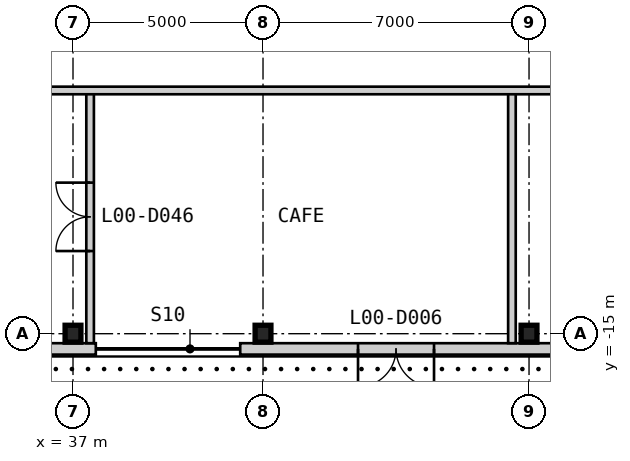
"""IFC4 building model, lengths in metres.
Left out: names, types, materials, properties, quantities, classifications, styles, units other than length and angle.
Written with IfcOpenShell. Run it as: python <this file> out.ifc"""

import sys

from ifc_helpers import new_model, si_unit, direction, frame, frame_2d, origin, origin_2d, place, context, subcontext, project, spatial, rectangle, i_section, extrude, element, fill, save


model = new_model("IFC4")
c1 = context("Model", 3, precision=1e-05, world=origin(), true_north=direction((0.0, 1.0)))
c2 = subcontext(c1, "Body", "Model", "MODEL_VIEW")
j1 = project(units=[si_unit("LENGTHUNIT", "METRE"), si_unit("PLANEANGLEUNIT", "RADIAN")], contexts=[c1])
p1 = place(None, origin())
s1 = spatial("IfcSite", under=j1, at=p1, CompositionType="ELEMENT")
p2 = place(p1, origin())
s2 = spatial("IfcBuilding", under=s1, at=p2, CompositionType="ELEMENT")
p3 = place(p2, origin())
s3 = spatial("IfcBuildingStorey", under=s2, at=p3, CompositionType="ELEMENT", Elevation=0.0)
for number, where, z_axis, x_axis in (
    (1, (37.0, -15.0, -0.3), (0.0, 0.0, 1.0), (1.0, 0.0, 0.0)),
    (2, (42.0, -15.0, -0.3), (0.0, 0.0, 1.0), (1.0, 0.0, 0.0)),
    (3, (49.0, -15.0, -0.3), (0.0, 0.0, 1.0), (1.0, 0.0, 0.0)),
):
    element("IfcColumn", number, at=place(p3, frame(where, z_axis=z_axis, x_axis=x_axis)), inside=s3, PredefinedType="COLUMN", context=c2, shape_type="SweptSolid", body=[
        extrude(i_section(OverallWidth=0.417, OverallDepth=0.445, WebThickness=0.039, FlangeThickness=0.063, at=origin_2d()), origin(), (0.0, 0.0, 1.0), 7.3),
    ])
p4 = place(p3, frame((36.4, -15.4, 0.0), z_axis=(0.0, 0.0, 1.0), x_axis=(1.0, 0.0, 0.0)))
e4 = element("IfcWall", 4, at=p4, inside=s3, PredefinedType="SOLIDWALL", context=c2, shape_type="SweptSolid", body=[
    extrude(rectangle(XDim=1.2, YDim=0.3, at=frame_2d((0.6, 0.0))), origin(), (0.0, 0.0, 1.0), 6.7),
])
p5 = place(p3, frame((41.4, -15.4, 0.0), z_axis=(0.0, 0.0, 1.0), x_axis=(1.0, 0.0, 0.0)))
e5 = element("IfcWall", 5, at=p5, inside=s3, PredefinedType="SOLIDWALL", context=c2, shape_type="SweptSolid", body=[
    extrude(rectangle(XDim=8.2, YDim=0.3, at=frame_2d((4.1, 0.0))), origin(), (0.0, 0.0, 1.0), 6.7),
])
p6 = place(p5, frame((3.1, 0.0, 0.0)))
e6 = element("IfcOpeningElement", 6, at=p6, cuts=e5, PredefinedType="OPENING", context=c2, shape_type="SweptSolid", body=[
    extrude(rectangle(XDim=2.0, YDim=3.0, at=frame_2d((1.0, 1.5))), frame((0.0, 0.16, 0.0), z_axis=(0.0, -1.0, 0.0), x_axis=(1.0, 0.0, 0.0)), (0.0, 0.0, 1.0), 0.32),
])
p7 = place(p3, frame((37.45, -15.25, 0.0), z_axis=(0.0, 0.0, 1.0), x_axis=(0.0, 1.0, 0.0)))
e7 = element("IfcWall", 7, at=p7, inside=s3, PredefinedType="PARTITIONING", context=c2, shape_type="SweptSolid", body=[
    extrude(rectangle(XDim=6.65, YDim=0.2, at=frame_2d((3.325, 0.0))), origin(), (0.0, 0.0, 1.0), 6.7),
])
p8 = place(p7, frame((2.425, 0.0, 0.0)))
e8 = element("IfcOpeningElement", 8, at=p8, cuts=e7, PredefinedType="OPENING", context=c2, shape_type="SweptSolid", body=[
    extrude(rectangle(XDim=1.8, YDim=2.4, at=frame_2d((0.9, 1.2))), frame((0.0, 0.11, 0.0), z_axis=(0.0, -1.0, 0.0), x_axis=(1.0, 0.0, 0.0)), (0.0, 0.0, 1.0), 0.22),
])
p9 = place(p3, frame((48.55, -15.25, 0.0), z_axis=(0.0, 0.0, 1.0), x_axis=(0.0, 1.0, 0.0)))
e9 = element("IfcWall", 9, at=p9, inside=s3, PredefinedType="PARTITIONING", context=c2, shape_type="SweptSolid", body=[
    extrude(rectangle(XDim=6.65, YDim=0.2, at=frame_2d((3.325, 0.0))), origin(), (0.0, 0.0, 1.0), 6.7),
])
p10 = place(p3, frame((34.4, -8.6, 0.0), z_axis=(0.0, 0.0, 1.0), x_axis=(1.0, 0.0, 0.0)))
e10 = element("IfcWall", 10, at=p10, inside=s3, PredefinedType="PARTITIONING", context=c2, shape_type="SweptSolid", body=[
    extrude(rectangle(XDim=16.2, YDim=0.2, at=frame_2d((8.1, 0.0))), origin(), (0.0, 0.0, 1.0), 6.7),
])
p11 = place(p6, frame((2.0, 0.0, 0.0), z_axis=(0.0, 0.0, 1.0), x_axis=(-1.0, 0.0, 0.0)))
e11 = element("IfcDoor", 11, at=p11, inside=s3, OperationType="DOUBLE_DOOR_SINGLE_SWING", PredefinedType="DOOR", context=c2, shape_type="SweptSolid", body=[
    extrude(rectangle(XDim=2.0, YDim=3.0, at=frame_2d((1.0, 1.5))), frame((0.0, 0.025, 0.0), z_axis=(0.0, -1.0, 0.0), x_axis=(1.0, 0.0, 0.0)), (0.0, 0.0, 1.0), 0.05),
])
fill(e6, e11)
p12 = place(p8, origin())
e12 = element("IfcDoor", 12, at=p12, inside=s3, OperationType="DOUBLE_DOOR_SINGLE_SWING", PredefinedType="DOOR", context=c2, shape_type="SweptSolid", body=[
    extrude(rectangle(XDim=1.8, YDim=2.4, at=frame_2d((0.9, 1.2))), frame((0.0, 0.025, 0.0), z_axis=(0.0, -1.0, 0.0), x_axis=(1.0, 0.0, 0.0)), (0.0, 0.0, 1.0), 0.05),
])
fill(e8, e12)
save(model, sys.argv[1])
